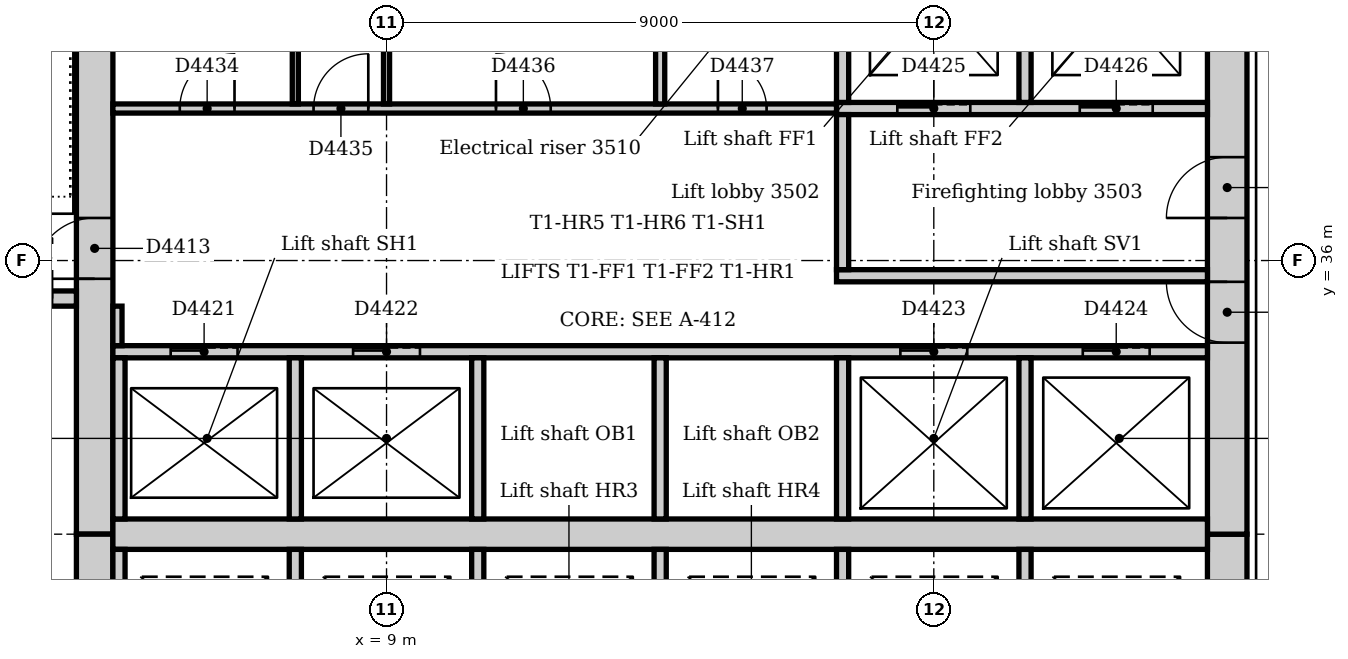
"""IFC4 building model, lengths in metres.
Left out: names, types, materials, properties, quantities, classifications, styles, units other than length and angle.
Written with IfcOpenShell. Run it as: python <this file> out.ifc"""

import sys

from ifc_helpers import new_model, si_unit, direction, frame, frame_2d, origin, place, context, subcontext, project, spatial, rectangle, extrude, element, fill, save


model = new_model("IFC4")
c1 = context("Model", 3, precision=1e-05, world=origin(), true_north=direction((0.0, 1.0)))
c2 = subcontext(c1, "Body", "Model", "MODEL_VIEW")
j1 = project(units=[si_unit("LENGTHUNIT", "METRE"), si_unit("PLANEANGLEUNIT", "RADIAN")], contexts=[c1])
p1 = place(None, origin())
s1 = spatial("IfcSite", under=j1, at=p1, CompositionType="ELEMENT")
p2 = place(p1, origin())
s2 = spatial("IfcBuilding", under=s1, at=p2, CompositionType="ELEMENT")
p3 = place(p2, frame((0.0, 0.0, 149.0)))
s3 = spatial("IfcBuildingStorey", under=s2, at=p3, CompositionType="ELEMENT", Elevation=149.0)
p4 = place(p3, frame((22.825, 21.0, 0.0), z_axis=(0.0, 0.0, 1.0), x_axis=(0.0, 1.0, 0.0)))
e1 = element("IfcWall", 1, at=p4, inside=s3, PredefinedType="SOLIDWALL", context=c2, shape_type="SweptSolid", body=[
    extrude(rectangle(XDim=10.5, YDim=0.65, at=frame_2d((5.25, 0.0))), origin(), (0.0, 0.0, 1.0), 4.0),
])
p5 = place(p4, frame((4.35, 0.0, 0.0)))
e2 = element("IfcOpeningElement", 2, at=p5, cuts=e1, PredefinedType="OPENING", context=c2, shape_type="SweptSolid", body=[
    extrude(rectangle(XDim=1.8, YDim=2.1, at=frame_2d((0.9, 1.05))), frame((0.0, 0.335, 0.0), z_axis=(0.0, -1.0, 0.0), x_axis=(1.0, 0.0, 0.0)), (0.0, 0.0, 1.0), 0.67),
])
p6 = place(p3, frame((22.825, 31.5, 0.0), z_axis=(0.0, 0.0, 1.0), x_axis=(0.0, 1.0, 0.0)))
e3 = element("IfcWall", 3, at=p6, inside=s3, PredefinedType="SOLIDWALL", context=c2, shape_type="SweptSolid", body=[
    extrude(rectangle(XDim=10.5, YDim=0.65, at=frame_2d((5.25, 0.0))), origin(), (0.0, 0.0, 1.0), 4.0),
])
p7 = place(p6, frame((3.15, 0.0, 0.0)))
e4 = element("IfcOpeningElement", 4, at=p7, cuts=e3, PredefinedType="OPENING", context=c2, shape_type="SweptSolid", body=[
    extrude(rectangle(XDim=1.0, YDim=2.1, at=frame_2d((0.5, 1.05))), frame((0.0, 0.335, 0.0), z_axis=(0.0, -1.0, 0.0), x_axis=(1.0, 0.0, 0.0)), (0.0, 0.0, 1.0), 0.67),
])
p8 = place(p6, frame((5.2, 0.0, 0.0)))
e5 = element("IfcOpeningElement", 5, at=p8, cuts=e3, PredefinedType="OPENING", context=c2, shape_type="SweptSolid", body=[
    extrude(rectangle(XDim=1.0, YDim=2.1, at=frame_2d((0.5, 1.05))), frame((0.0, 0.335, 0.0), z_axis=(0.0, -1.0, 0.0), x_axis=(1.0, 0.0, 0.0)), (0.0, 0.0, 1.0), 0.67),
])
p9 = place(p3, frame((4.2, 42.0, 0.0), z_axis=(0.0, 0.0, 1.0), x_axis=(0.0, -1.0, 0.0)))
e6 = element("IfcWall", 6, at=p9, inside=s3, PredefinedType="SOLIDWALL", context=c2, shape_type="SweptSolid", body=[
    extrude(rectangle(XDim=10.5, YDim=0.6, at=frame_2d((5.25, 0.0))), origin(), (0.0, 0.0, 1.0), 4.0),
])
p10 = place(p9, frame((5.3, 0.0, 0.0)))
e7 = element("IfcOpeningElement", 7, at=p10, cuts=e6, PredefinedType="OPENING", context=c2, shape_type="SweptSolid", body=[
    extrude(rectangle(XDim=1.0, YDim=2.1, at=frame_2d((0.5, 1.05))), frame((0.0, 0.31, 0.0), z_axis=(0.0, -1.0, 0.0), x_axis=(1.0, 0.0, 0.0)), (0.0, 0.0, 1.0), 0.62),
])
p11 = place(p3, frame((4.2, 31.5, 0.0), z_axis=(0.0, 0.0, 1.0), x_axis=(0.0, -1.0, 0.0)))
e8 = element("IfcWall", 8, at=p11, inside=s3, PredefinedType="SOLIDWALL", context=c2, shape_type="SweptSolid", body=[
    extrude(rectangle(XDim=10.5, YDim=0.6, at=frame_2d((5.25, 0.0))), origin(), (0.0, 0.0, 1.0), 4.0),
])
p12 = place(p11, frame((4.25, 0.0, 0.0)))
e9 = element("IfcOpeningElement", 9, at=p12, cuts=e8, PredefinedType="OPENING", context=c2, shape_type="SweptSolid", body=[
    extrude(rectangle(XDim=1.0, YDim=2.1, at=frame_2d((0.5, 1.05))), frame((0.0, 0.31, 0.0), z_axis=(0.0, -1.0, 0.0), x_axis=(1.0, 0.0, 0.0)), (0.0, 0.0, 1.0), 0.62),
])
p13 = place(p3, frame((4.5, 31.5, 0.0), z_axis=(0.0, 0.0, 1.0), x_axis=(1.0, 0.0, 0.0)))
e10 = element("IfcWall", 10, at=p13, inside=s3, PredefinedType="SOLIDWALL", context=c2, shape_type="SweptSolid", body=[
    extrude(rectangle(XDim=18.0, YDim=0.5, at=frame_2d((9.0, 0.0))), origin(), (0.0, 0.0, 1.0), 4.0),
])
p14 = place(p3, frame((0.36, 35.375, 0.0), z_axis=(0.0, 0.0, 1.0), x_axis=(1.0, 0.0, 0.0)))
e11 = element("IfcWall", 11, at=p14, inside=s3, PredefinedType="SOLIDWALL", context=c2, shape_type="SweptSolid", body=[
    extrude(rectangle(XDim=3.54, YDim=0.25, at=frame_2d((1.77, 0.0))), origin(), (0.0, 0.0, 1.0), 4.0),
])
p15 = place(p14, frame((2.14, 0.0, 0.0)))
e12 = element("IfcOpeningElement", 12, at=p15, cuts=e11, PredefinedType="OPENING", context=c2, shape_type="SweptSolid", body=[
    extrude(rectangle(XDim=1.0, YDim=2.1, at=frame_2d((0.5, 1.05))), frame((0.0, 0.135, 0.0), z_axis=(0.0, -1.0, 0.0), x_axis=(1.0, 0.0, 0.0)), (0.0, 0.0, 1.0), 0.27),
])
p16 = place(p3, frame((16.4, 35.75, 0.0), z_axis=(0.0, 0.0, 1.0), x_axis=(1.0, 0.0, 0.0)))
e13 = element("IfcWall", 13, at=p16, inside=s3, PredefinedType="PARTITIONING", context=c2, shape_type="SweptSolid", body=[
    extrude(rectangle(XDim=6.1, YDim=0.2, at=frame_2d((3.05, 0.0))), origin(), (0.0, 0.0, 1.0), 3.85),
])
p17 = place(p3, frame((16.4, 38.5, 0.0), z_axis=(0.0, 0.0, 1.0), x_axis=(1.0, 0.0, 0.0)))
e14 = element("IfcWall", 14, at=p17, inside=s3, PredefinedType="PARTITIONING", context=c2, shape_type="SweptSolid", body=[
    extrude(rectangle(XDim=6.1, YDim=0.2, at=frame_2d((3.05, 0.0))), origin(), (0.0, 0.0, 1.0), 3.85),
])
p18 = place(p17, frame((1.0, 0.0, 0.0)))
e15 = element("IfcOpeningElement", 15, at=p18, cuts=e14, PredefinedType="OPENING", context=c2, shape_type="SweptSolid", body=[
    extrude(rectangle(XDim=1.2, YDim=2.1, at=frame_2d((0.6, 1.05))), frame((0.0, 0.11, 0.0), z_axis=(0.0, -1.0, 0.0), x_axis=(1.0, 0.0, 0.0)), (0.0, 0.0, 1.0), 0.22),
])
p19 = place(p17, frame((4.0, 0.0, 0.0)))
e16 = element("IfcOpeningElement", 16, at=p19, cuts=e14, PredefinedType="OPENING", context=c2, shape_type="SweptSolid", body=[
    extrude(rectangle(XDim=1.2, YDim=2.1, at=frame_2d((0.6, 1.05))), frame((0.0, 0.11, 0.0), z_axis=(0.0, -1.0, 0.0), x_axis=(1.0, 0.0, 0.0)), (0.0, 0.0, 1.0), 0.22),
])
p20 = place(p3, frame((16.5, 35.85, 0.0), z_axis=(0.0, 0.0, 1.0), x_axis=(0.0, 1.0, 0.0)))
e17 = element("IfcWall", 17, at=p20, inside=s3, PredefinedType="PARTITIONING", context=c2, shape_type="SweptSolid", body=[
    extrude(rectangle(XDim=2.55, YDim=0.2, at=frame_2d((1.275, 0.0))), origin(), (0.0, 0.0, 1.0), 3.85),
])
p21 = place(p3, frame((4.5, 34.5, 0.0), z_axis=(0.0, 0.0, 1.0), x_axis=(1.0, 0.0, 0.0)))
e18 = element("IfcWall", 18, at=p21, inside=s3, PredefinedType="PARTITIONING", context=c2, shape_type="SweptSolid", body=[
    extrude(rectangle(XDim=18.0, YDim=0.2, at=frame_2d((9.0, 0.0))), origin(), (0.0, 0.0, 1.0), 3.85),
])
p22 = place(p21, frame((0.95, 0.0, 0.0)))
e19 = element("IfcOpeningElement", 19, at=p22, cuts=e18, PredefinedType="OPENING", context=c2, shape_type="SweptSolid", body=[
    extrude(rectangle(XDim=1.1, YDim=2.1, at=frame_2d((0.55, 1.05))), frame((0.0, 0.11, 0.0), z_axis=(0.0, -1.0, 0.0), x_axis=(1.0, 0.0, 0.0)), (0.0, 0.0, 1.0), 0.22),
])
p23 = place(p21, frame((3.95, 0.0, 0.0)))
e20 = element("IfcOpeningElement", 20, at=p23, cuts=e18, PredefinedType="OPENING", context=c2, shape_type="SweptSolid", body=[
    extrude(rectangle(XDim=1.1, YDim=2.1, at=frame_2d((0.55, 1.05))), frame((0.0, 0.11, 0.0), z_axis=(0.0, -1.0, 0.0), x_axis=(1.0, 0.0, 0.0)), (0.0, 0.0, 1.0), 0.22),
])
p24 = place(p21, frame((12.95, 0.0, 0.0)))
e21 = element("IfcOpeningElement", 21, at=p24, cuts=e18, PredefinedType="OPENING", context=c2, shape_type="SweptSolid", body=[
    extrude(rectangle(XDim=1.1, YDim=2.1, at=frame_2d((0.55, 1.05))), frame((0.0, 0.11, 0.0), z_axis=(0.0, -1.0, 0.0), x_axis=(1.0, 0.0, 0.0)), (0.0, 0.0, 1.0), 0.22),
])
p25 = place(p21, frame((15.95, 0.0, 0.0)))
e22 = element("IfcOpeningElement", 22, at=p25, cuts=e18, PredefinedType="OPENING", context=c2, shape_type="SweptSolid", body=[
    extrude(rectangle(XDim=1.1, YDim=2.1, at=frame_2d((0.55, 1.05))), frame((0.0, 0.11, 0.0), z_axis=(0.0, -1.0, 0.0), x_axis=(1.0, 0.0, 0.0)), (0.0, 0.0, 1.0), 0.22),
])
for number, where, z_axis, x_axis in (
    (23, (4.6, 31.75, 0.0), (0.0, 0.0, 1.0), (0.0, 1.0, 0.0)),
    (24, (4.6, 28.6, 0.0), (0.0, 0.0, 1.0), (0.0, 1.0, 0.0)),
    (25, (7.5, 28.6, 0.0), (0.0, 0.0, 1.0), (0.0, 1.0, 0.0)),
    (26, (7.5, 31.75, 0.0), (0.0, 0.0, 1.0), (0.0, 1.0, 0.0)),
    (27, (10.5, 28.6, 0.0), (0.0, 0.0, 1.0), (0.0, 1.0, 0.0)),
    (28, (10.5, 31.75, 0.0), (0.0, 0.0, 1.0), (0.0, 1.0, 0.0)),
    (29, (13.5, 28.6, 0.0), (0.0, 0.0, 1.0), (0.0, 1.0, 0.0)),
    (30, (13.5, 31.75, 0.0), (0.0, 0.0, 1.0), (0.0, 1.0, 0.0)),
    (31, (16.5, 28.6, 0.0), (0.0, 0.0, 1.0), (0.0, 1.0, 0.0)),
    (32, (16.5, 31.75, 0.0), (0.0, 0.0, 1.0), (0.0, 1.0, 0.0)),
    (33, (19.5, 28.6, 0.0), (0.0, 0.0, 1.0), (0.0, 1.0, 0.0)),
    (34, (19.5, 31.75, 0.0), (0.0, 0.0, 1.0), (0.0, 1.0, 0.0)),
):
    element("IfcWall", number, at=place(p3, frame(where, z_axis=z_axis, x_axis=x_axis)), inside=s3, PredefinedType="PARTITIONING", context=c2, shape_type="SweptSolid", body=[
        extrude(rectangle(XDim=2.65, YDim=0.2, at=frame_2d((1.325, 0.0))), origin(), (0.0, 0.0, 1.0), 3.85),
    ])
for number, where, z_axis, x_axis in (
    (35, (16.5, 38.6, 0.0), (0.0, 0.0, 1.0), (0.0, 1.0, 0.0)),
    (36, (19.5, 38.6, 0.0), (0.0, 0.0, 1.0), (0.0, 1.0, 0.0)),
):
    element("IfcWall", number, at=place(p3, frame(where, z_axis=z_axis, x_axis=x_axis)), inside=s3, PredefinedType="PARTITIONING", context=c2, shape_type="SweptSolid", body=[
        extrude(rectangle(XDim=3.4, YDim=0.2, at=frame_2d((1.7, 0.0))), origin(), (0.0, 0.0, 1.0), 3.85),
    ])
p26 = place(p3, frame((4.5, 38.5, 0.0), z_axis=(0.0, 0.0, 1.0), x_axis=(1.0, 0.0, 0.0)))
e37 = element("IfcWall", 37, at=p26, inside=s3, PredefinedType="PARTITIONING", context=c2, shape_type="SweptSolid", body=[
    extrude(rectangle(XDim=11.9, YDim=0.15, at=frame_2d((5.95, 0.0))), origin(), (0.0, 0.0, 1.0), 3.85),
])
p27 = place(p26, frame((1.1, 0.0, 0.0)))
e38 = element("IfcOpeningElement", 38, at=p27, cuts=e37, PredefinedType="OPENING", context=c2, shape_type="SweptSolid", body=[
    extrude(rectangle(XDim=0.9, YDim=2.1, at=frame_2d((0.45, 1.05))), frame((0.0, 0.085, 0.0), z_axis=(0.0, -1.0, 0.0), x_axis=(1.0, 0.0, 0.0)), (0.0, 0.0, 1.0), 0.17),
])
p28 = place(p26, frame((3.3, 0.0, 0.0)))
e39 = element("IfcOpeningElement", 39, at=p28, cuts=e37, PredefinedType="OPENING", context=c2, shape_type="SweptSolid", body=[
    extrude(rectangle(XDim=0.9, YDim=2.1, at=frame_2d((0.45, 1.05))), frame((0.0, 0.085, 0.0), z_axis=(0.0, -1.0, 0.0), x_axis=(1.0, 0.0, 0.0)), (0.0, 0.0, 1.0), 0.17),
])
p29 = place(p26, frame((6.3, 0.0, 0.0)))
e40 = element("IfcOpeningElement", 40, at=p29, cuts=e37, PredefinedType="OPENING", context=c2, shape_type="SweptSolid", body=[
    extrude(rectangle(XDim=0.9, YDim=2.1, at=frame_2d((0.45, 1.05))), frame((0.0, 0.085, 0.0), z_axis=(0.0, -1.0, 0.0), x_axis=(1.0, 0.0, 0.0)), (0.0, 0.0, 1.0), 0.17),
])
p30 = place(p26, frame((9.95, 0.0, 0.0)))
e41 = element("IfcOpeningElement", 41, at=p30, cuts=e37, PredefinedType="OPENING", context=c2, shape_type="SweptSolid", body=[
    extrude(rectangle(XDim=0.8, YDim=2.1, at=frame_2d((0.4, 1.05))), frame((0.0, 0.085, 0.0), z_axis=(0.0, -1.0, 0.0), x_axis=(1.0, 0.0, 0.0)), (0.0, 0.0, 1.0), 0.17),
])
p31 = place(p3, frame((4.575, 34.6, 0.0), z_axis=(0.0, 0.0, 1.0), x_axis=(0.0, 1.0, 0.0)))
e42 = element("IfcWall", 42, at=p31, inside=s3, PredefinedType="PARTITIONING", context=c2, shape_type="SweptSolid", body=[
    extrude(rectangle(XDim=0.65, YDim=0.15, at=frame_2d((0.325, 0.0))), origin(), (0.0, 0.0, 1.0), 3.85),
])
p32 = place(p3, frame((13.5, 38.575, 0.0), z_axis=(0.0, 0.0, 1.0), x_axis=(0.0, 1.0, 0.0)))
e43 = element("IfcWall", 43, at=p32, inside=s3, PredefinedType="PARTITIONING", context=c2, shape_type="SweptSolid", body=[
    extrude(rectangle(XDim=3.425, YDim=0.15, at=frame_2d((1.712, 0.0))), origin(), (0.0, 0.0, 1.0), 3.85),
])
for number, where, z_axis, x_axis in (
    (44, (7.5, 38.575, 0.0), (0.0, 0.0, 1.0), (0.0, 1.0, 0.0)),
    (45, (9.0, 38.575, 0.0), (0.0, 0.0, 1.0), (0.0, 1.0, 0.0)),
):
    element("IfcWall", number, at=place(p3, frame(where, z_axis=z_axis, x_axis=x_axis)), inside=s3, PredefinedType="PARTITIONING", context=c2, shape_type="SweptSolid", body=[
        extrude(rectangle(XDim=3.425, YDim=0.1, at=frame_2d((1.712, 0.0))), origin(), (0.0, 0.0, 1.0), 3.85),
    ])
p33 = place(p10, frame((1.0, 0.0, 0.0), z_axis=(0.0, 0.0, 1.0), x_axis=(-1.0, 0.0, 0.0)))
e46 = element("IfcDoor", 46, at=p33, inside=s3, OperationType="SINGLE_SWING_LEFT", PredefinedType="DOOR", context=c2, shape_type="SweptSolid", body=[
    extrude(rectangle(XDim=1.0, YDim=2.1, at=frame_2d((0.5, 1.05))), frame((0.0, 0.025, 0.0), z_axis=(0.0, -1.0, 0.0), x_axis=(1.0, 0.0, 0.0)), (0.0, 0.0, 1.0), 0.05),
])
fill(e7, e46)
p34 = place(p22, origin())
e47 = element("IfcDoor", 47, at=p34, inside=s3, OperationType="SLIDING_TO_LEFT", PredefinedType="DOOR", context=c2, shape_type="SweptSolid", body=[
    extrude(rectangle(XDim=1.1, YDim=2.1, at=frame_2d((0.55, 1.05))), frame((0.0, 0.025, 0.0), z_axis=(0.0, -1.0, 0.0), x_axis=(1.0, 0.0, 0.0)), (0.0, 0.0, 1.0), 0.05),
])
fill(e19, e47)
p35 = place(p23, origin())
e48 = element("IfcDoor", 48, at=p35, inside=s3, OperationType="SLIDING_TO_LEFT", PredefinedType="DOOR", context=c2, shape_type="SweptSolid", body=[
    extrude(rectangle(XDim=1.1, YDim=2.1, at=frame_2d((0.55, 1.05))), frame((0.0, 0.025, 0.0), z_axis=(0.0, -1.0, 0.0), x_axis=(1.0, 0.0, 0.0)), (0.0, 0.0, 1.0), 0.05),
])
fill(e20, e48)
p36 = place(p24, origin())
e49 = element("IfcDoor", 49, at=p36, inside=s3, OperationType="SLIDING_TO_LEFT", PredefinedType="DOOR", context=c2, shape_type="SweptSolid", body=[
    extrude(rectangle(XDim=1.1, YDim=2.1, at=frame_2d((0.55, 1.05))), frame((0.0, 0.025, 0.0), z_axis=(0.0, -1.0, 0.0), x_axis=(1.0, 0.0, 0.0)), (0.0, 0.0, 1.0), 0.05),
])
fill(e21, e49)
p37 = place(p25, origin())
e50 = element("IfcDoor", 50, at=p37, inside=s3, OperationType="SLIDING_TO_LEFT", PredefinedType="DOOR", context=c2, shape_type="SweptSolid", body=[
    extrude(rectangle(XDim=1.1, YDim=2.1, at=frame_2d((0.55, 1.05))), frame((0.0, 0.025, 0.0), z_axis=(0.0, -1.0, 0.0), x_axis=(1.0, 0.0, 0.0)), (0.0, 0.0, 1.0), 0.05),
])
fill(e22, e50)
p38 = place(p18, origin())
e51 = element("IfcDoor", 51, at=p38, inside=s3, OperationType="SLIDING_TO_LEFT", PredefinedType="DOOR", context=c2, shape_type="SweptSolid", body=[
    extrude(rectangle(XDim=1.2, YDim=2.1, at=frame_2d((0.6, 1.05))), frame((0.0, 0.025, 0.0), z_axis=(0.0, -1.0, 0.0), x_axis=(1.0, 0.0, 0.0)), (0.0, 0.0, 1.0), 0.05),
])
fill(e15, e51)
p39 = place(p19, origin())
e52 = element("IfcDoor", 52, at=p39, inside=s3, OperationType="SLIDING_TO_LEFT", PredefinedType="DOOR", context=c2, shape_type="SweptSolid", body=[
    extrude(rectangle(XDim=1.2, YDim=2.1, at=frame_2d((0.6, 1.05))), frame((0.0, 0.025, 0.0), z_axis=(0.0, -1.0, 0.0), x_axis=(1.0, 0.0, 0.0)), (0.0, 0.0, 1.0), 0.05),
])
fill(e16, e52)
p40 = place(p7, origin())
e53 = element("IfcDoor", 53, at=p40, inside=s3, OperationType="SINGLE_SWING_RIGHT", PredefinedType="DOOR", context=c2, shape_type="SweptSolid", body=[
    extrude(rectangle(XDim=1.0, YDim=2.1, at=frame_2d((0.5, 1.05))), frame((0.0, 0.025, 0.0), z_axis=(0.0, -1.0, 0.0), x_axis=(1.0, 0.0, 0.0)), (0.0, 0.0, 1.0), 0.05),
])
fill(e4, e53)
p41 = place(p8, origin())
e54 = element("IfcDoor", 54, at=p41, inside=s3, OperationType="SINGLE_SWING_LEFT", PredefinedType="DOOR", context=c2, shape_type="SweptSolid", body=[
    extrude(rectangle(XDim=1.0, YDim=2.1, at=frame_2d((0.5, 1.05))), frame((0.0, 0.025, 0.0), z_axis=(0.0, -1.0, 0.0), x_axis=(1.0, 0.0, 0.0)), (0.0, 0.0, 1.0), 0.05),
])
fill(e5, e54)
p42 = place(p27, origin())
e55 = element("IfcDoor", 55, at=p42, inside=s3, OperationType="SINGLE_SWING_RIGHT", PredefinedType="DOOR", context=c2, shape_type="SweptSolid", body=[
    extrude(rectangle(XDim=0.9, YDim=2.1, at=frame_2d((0.45, 1.05))), frame((0.0, 0.025, 0.0), z_axis=(0.0, -1.0, 0.0), x_axis=(1.0, 0.0, 0.0)), (0.0, 0.0, 1.0), 0.05),
])
fill(e38, e55)
p43 = place(p28, origin())
e56 = element("IfcDoor", 56, at=p43, inside=s3, OperationType="SINGLE_SWING_RIGHT", PredefinedType="DOOR", context=c2, shape_type="SweptSolid", body=[
    extrude(rectangle(XDim=0.9, YDim=2.1, at=frame_2d((0.45, 1.05))), frame((0.0, 0.025, 0.0), z_axis=(0.0, -1.0, 0.0), x_axis=(1.0, 0.0, 0.0)), (0.0, 0.0, 1.0), 0.05),
])
fill(e39, e56)
p44 = place(p29, origin())
e57 = element("IfcDoor", 57, at=p44, inside=s3, OperationType="SINGLE_SWING_LEFT", PredefinedType="DOOR", context=c2, shape_type="SweptSolid", body=[
    extrude(rectangle(XDim=0.9, YDim=2.1, at=frame_2d((0.45, 1.05))), frame((0.0, 0.025, 0.0), z_axis=(0.0, -1.0, 0.0), x_axis=(1.0, 0.0, 0.0)), (0.0, 0.0, 1.0), 0.05),
])
fill(e40, e57)
p45 = place(p30, origin())
e58 = element("IfcDoor", 58, at=p45, inside=s3, OperationType="SINGLE_SWING_LEFT", PredefinedType="DOOR", context=c2, shape_type="SweptSolid", body=[
    extrude(rectangle(XDim=0.8, YDim=2.1, at=frame_2d((0.4, 1.05))), frame((0.0, 0.025, 0.0), z_axis=(0.0, -1.0, 0.0), x_axis=(1.0, 0.0, 0.0)), (0.0, 0.0, 1.0), 0.05),
])
fill(e41, e58)
save(model, sys.argv[1])
